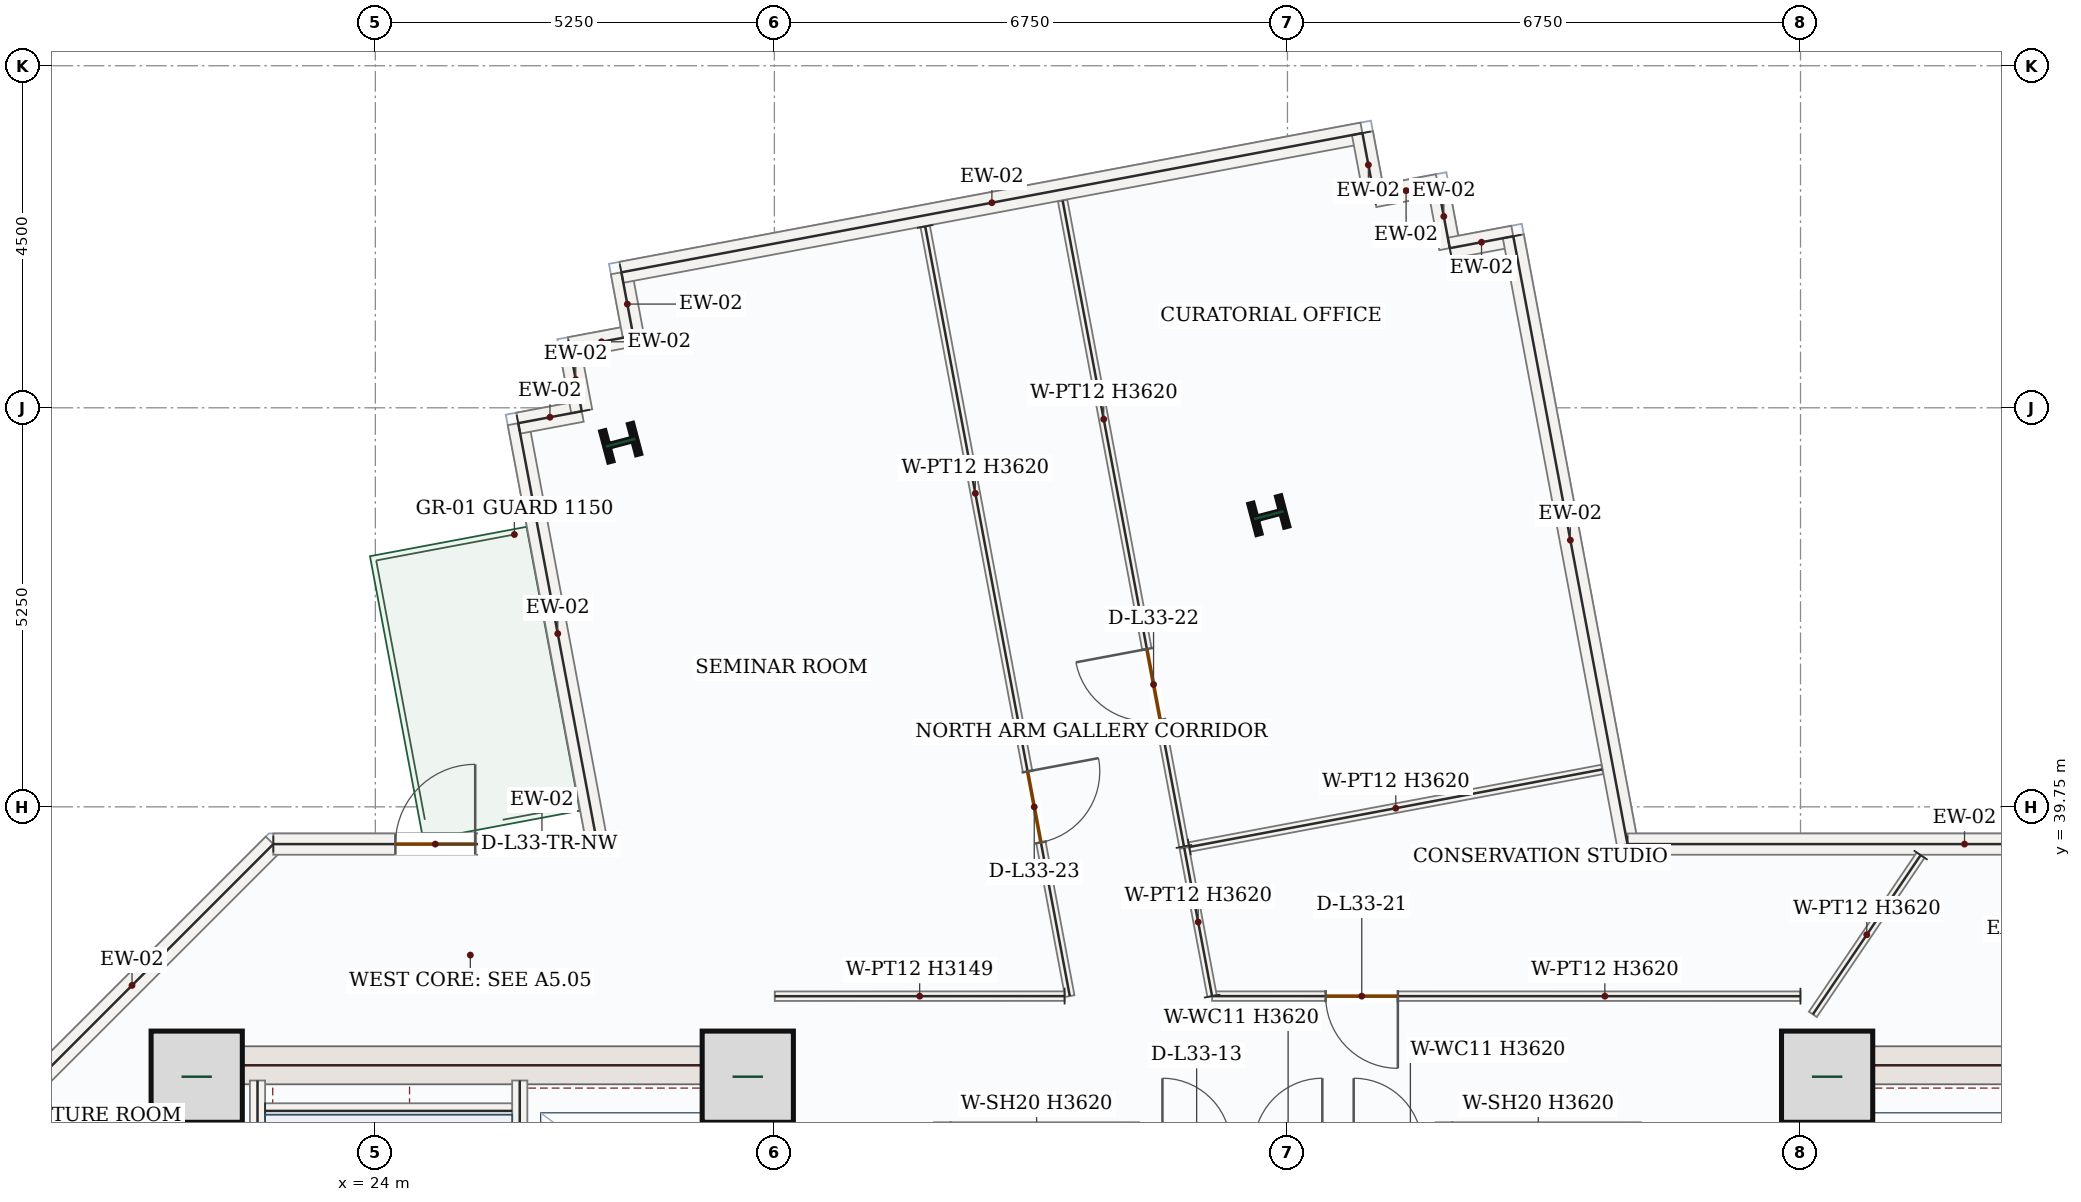
"""IFC4 building model, lengths in metres.
Left out: names, types, materials, properties, quantities, classifications, styles, units other than length and angle.
Written with IfcOpenShell. Run it as: python <this file> out.ifc"""

import sys

from ifc_helpers import new_model, si_unit, direction, frame, frame_2d, origin, origin_2d, place, context, subcontext, project, spatial, rectangle, i_section, extrude, source, transform, mapped, element, fill, save


model = new_model("IFC4")
c1 = context("Model", 3, precision=1e-05, world=origin(), true_north=direction((0.0, 1.0)))
c2 = subcontext(c1, "Body", "Model", "MODEL_VIEW")
j1 = project(units=[si_unit("LENGTHUNIT", "METRE"), si_unit("PLANEANGLEUNIT", "RADIAN")], contexts=[c1])
p1 = place(None, origin())
s1 = spatial("IfcSite", under=j1, at=p1, CompositionType="ELEMENT")
p2 = place(p1, origin())
s2 = spatial("IfcBuilding", under=s1, at=p2, CompositionType="ELEMENT")
p3 = place(p2, frame((0.0, 0.0, 147.3)))
s3 = spatial("IfcBuildingStorey", under=s2, at=p3, CompositionType="ELEMENT", Elevation=147.3)
m1 = source(origin(), c2, "Body", "SweptSolid", [
    extrude(rectangle(XDim=8.55, YDim=0.5, at=frame_2d((4.275, 0.0))), origin(), (0.0, 0.0, 1.0), 3.62),
])
p4 = place(p3, frame((21.5, 28.05, 0.0), z_axis=(0.0, 0.0, 1.0), x_axis=(0.0, 1.0, 0.0)))
e1 = element("IfcWall", 1, at=p4, inside=s3, PredefinedType="SHEAR", context=c2, shape_type="MappedRepresentation", body=[
    mapped(m1, transform((0.0, 0.0, 0.0), x_axis=(1.0, 0.0, 0.0), y_axis=(0.0, 1.0, 0.0), z_axis=(0.0, 0.0, 1.0), scale=1.0)),
])
p5 = place(p3, frame((29.0, 28.05, 0.0), z_axis=(0.0, 0.0, 1.0), x_axis=(0.0, 1.0, 0.0)))
e2 = element("IfcWall", 2, at=p5, inside=s3, PredefinedType="SHEAR", context=c2, shape_type="SweptSolid", body=[
    extrude(rectangle(XDim=8.55, YDim=0.5, at=frame_2d((4.275, 0.0))), origin(), (0.0, 0.0, 1.0), 3.62),
])
p6 = place(p5, frame((1.5, 0.0, 0.0)))
e3 = element("IfcOpeningElement", 3, at=p6, cuts=e2, PredefinedType="OPENING", context=c2, shape_type="SweptSolid", body=[
    extrude(rectangle(XDim=1.1, YDim=2.2, at=frame_2d((0.55, 1.1))), frame((0.0, 0.26, 0.0), z_axis=(0.0, -1.0, 0.0), x_axis=(1.0, 0.0, 0.0)), (0.0, 0.0, 1.0), 0.52),
])
m2 = source(origin(), c2, "Body", "SweptSolid", [
    extrude(rectangle(XDim=7.0, YDim=0.5, at=frame_2d((3.5, 0.0))), origin(), (0.0, 0.0, 1.0), 3.62),
])
p7 = place(p3, frame((21.75, 36.35, 0.0), z_axis=(0.0, 0.0, 1.0), x_axis=(1.0, 0.0, 0.0)))
e4 = element("IfcWall", 4, at=p7, inside=s3, PredefinedType="SHEAR", context=c2, shape_type="MappedRepresentation", body=[
    mapped(m2, transform((0.0, 0.0, 0.0), x_axis=(1.0, 0.0, 0.0), y_axis=(0.0, 1.0, 0.0), z_axis=(0.0, 0.0, 1.0), scale=1.0)),
])
p8 = place(p3, frame((43.0, 28.05, 0.0), z_axis=(0.0, 0.0, 1.0), x_axis=(0.0, 1.0, 0.0)))
e5 = element("IfcWall", 5, at=p8, inside=s3, PredefinedType="SHEAR", context=c2, shape_type="SweptSolid", body=[
    extrude(rectangle(XDim=8.55, YDim=0.5, at=frame_2d((4.275, 0.0))), origin(), (0.0, 0.0, 1.0), 3.62),
])
p9 = place(p8, frame((1.5, 0.0, 0.0)))
e6 = element("IfcOpeningElement", 6, at=p9, cuts=e5, PredefinedType="OPENING", context=c2, shape_type="SweptSolid", body=[
    extrude(rectangle(XDim=1.1, YDim=2.2, at=frame_2d((0.55, 1.1))), frame((0.0, 0.26, 0.0), z_axis=(0.0, -1.0, 0.0), x_axis=(1.0, 0.0, 0.0)), (0.0, 0.0, 1.0), 0.52),
])
p10 = place(p3, frame((43.25, 36.35, 0.0), z_axis=(0.0, 0.0, 1.0), x_axis=(1.0, 0.0, 0.0)))
e7 = element("IfcWall", 7, at=p10, inside=s3, PredefinedType="SHEAR", context=c2, shape_type="MappedRepresentation", body=[
    mapped(m2, transform((0.0, 0.0, 0.0), x_axis=(1.0, 0.0, 0.0), y_axis=(0.0, 1.0, 0.0), z_axis=(0.0, 0.0, 1.0), scale=1.0)),
])
m3 = source(origin(), c2, "Body", "SweptSolid", [
    extrude(rectangle(XDim=1.2, YDim=1.2, at=origin_2d()), origin(), (0.0, 0.0, 1.0), 3.9),
])
for number, where, z_axis, x_axis in (
    (8, (21.65, 36.2, 0.0), (0.0, 0.0, 1.0), (1.0, 0.0, 0.0)),
    (9, (28.9, 36.2, 0.0), (0.0, 0.0, 1.0), (1.0, 0.0, 0.0)),
    (10, (43.1, 36.2, 0.0), (0.0, 0.0, 1.0), (1.0, 0.0, 0.0)),
):
    element("IfcColumn", number, at=place(p3, frame(where, z_axis=z_axis, x_axis=x_axis)), inside=s3, PredefinedType="COLUMN", context=c2, shape_type="MappedRepresentation", body=[
        mapped(m3, transform((0.0, 0.0, 0.0), x_axis=(1.0, 0.0, 0.0), y_axis=(0.0, 1.0, 0.0), z_axis=(0.0, 0.0, 1.0), scale=1.0)),
    ])
m4 = source(origin(), c2, "Body", "SweptSolid", [
    extrude(i_section(OverallWidth=0.412, OverallDepth=0.435, WebThickness=0.036, FlangeThickness=0.057, FilletRadius=0.018, at=origin_2d()), origin(), (0.0, 0.0, 1.0), 3.9),
])
for number, where, z_axis, x_axis in (
    (11, (35.755, 43.588, 0.0), (0.0, 0.0, 1.0), (-0.255, 0.967, 0.0)),
    (12, (27.228, 44.541, 0.0), (0.0, 0.0, 1.0), (-0.255, 0.967, 0.0)),
):
    element("IfcColumn", number, at=place(p3, frame(where, z_axis=z_axis, x_axis=x_axis)), inside=s3, PredefinedType="COLUMN", context=c2, shape_type="MappedRepresentation", body=[
        mapped(m4, transform((0.0, 0.0, 0.0), x_axis=(1.0, 0.0, 0.0), y_axis=(0.0, 1.0, 0.0), z_axis=(0.0, 0.0, 1.0), scale=1.0)),
    ])
m5 = source(origin(), c2, "Body", "SweptSolid", [
    extrude(rectangle(XDim=5.258, YDim=0.28, at=frame_2d((2.629, 0.0))), origin(), (0.0, 0.0, 1.0), 3.62),
])
p11 = place(p3, frame((18.94, 35.542, 0.0), z_axis=(0.0, 0.0, 1.0), x_axis=(0.707106781187, 0.707106781187, 0.0)))
e13 = element("IfcWall", 13, at=p11, inside=s3, PredefinedType="SOLIDWALL", context=c2, shape_type="MappedRepresentation", body=[
    mapped(m5, transform((0.0, 0.0, 0.0), x_axis=(1.0, 0.0, 0.0), y_axis=(0.0, 1.0, 0.0), z_axis=(0.0, 0.0, 1.0), scale=1.0)),
])
p12 = place(p3, frame((22.658, 39.26, 0.0), z_axis=(0.0, 0.0, 1.0), x_axis=(1.0, 0.0, 0.0)))
e14 = element("IfcWall", 14, at=p12, inside=s3, PredefinedType="SOLIDWALL", context=c2, shape_type="SweptSolid", body=[
    extrude(rectangle(XDim=4.262, YDim=0.28, at=frame_2d((2.131, 0.0))), origin(), (0.0, 0.0, 1.0), 3.62),
])
p13 = place(p12, frame((1.606, 0.0, 0.0)))
e15 = element("IfcOpeningElement", 15, at=p13, cuts=e14, PredefinedType="OPENING", context=c2, shape_type="SweptSolid", body=[
    extrude(rectangle(XDim=1.05, YDim=2.15, at=frame_2d((0.525, 1.075))), frame((0.0, 0.15, 0.0), z_axis=(0.0, -1.0, 0.0), x_axis=(1.0, 0.0, 0.0)), (0.0, 0.0, 1.0), 0.3),
])
m6 = source(origin(), c2, "Body", "SweptSolid", [
    extrude(rectangle(XDim=5.634, YDim=0.28, at=frame_2d((2.817, 0.0))), origin(), (0.0, 0.0, 1.0), 3.62),
])
p14 = place(p3, frame((26.92, 39.26, 0.0), z_axis=(0.0, 0.0, 1.0), x_axis=(-0.184678339457, 0.982799018587, 0.0)))
e16 = element("IfcWall", 16, at=p14, inside=s3, PredefinedType="SOLIDWALL", context=c2, shape_type="MappedRepresentation", body=[
    mapped(m6, transform((0.0, 0.0, 0.0), x_axis=(1.0, 0.0, 0.0), y_axis=(0.0, 1.0, 0.0), z_axis=(0.0, 0.0, 1.0), scale=1.0)),
])
m7 = source(origin(), c2, "Body", "SweptSolid", [
    extrude(rectangle(XDim=0.85, YDim=0.28, at=frame_2d((0.425, 0.0))), origin(), (0.0, 0.0, 1.0), 3.62),
])
for number, where, z_axis, x_axis in (
    (17, (25.88, 44.797, 0.0), (0.0, 0.0, 1.0), (0.983, 0.185, 0.0)),
    (18, (26.715, 44.954, 0.0), (0.0, 0.0, 1.0), (-0.185, 0.983, 0.0)),
    (19, (26.558, 45.79, 0.0), (0.0, 0.0, 1.0), (0.983, 0.185, 0.0)),
    (20, (27.394, 45.947, 0.0), (0.0, 0.0, 1.0), (-0.185, 0.983, 0.0)),
):
    element("IfcWall", number, at=place(p3, frame(where, z_axis=z_axis, x_axis=x_axis)), inside=s3, PredefinedType="SOLIDWALL", context=c2, shape_type="MappedRepresentation", body=[
        mapped(m7, transform((0.0, 0.0, 0.0), x_axis=(1.0, 0.0, 0.0), y_axis=(0.0, 1.0, 0.0), z_axis=(0.0, 0.0, 1.0), scale=1.0)),
    ])
m8 = source(origin(), c2, "Body", "SweptSolid", [
    extrude(rectangle(XDim=9.92, YDim=0.28, at=frame_2d((4.96, 0.0))), origin(), (0.0, 0.0, 1.0), 3.62),
])
p15 = place(p3, frame((27.237, 46.782, 0.0), z_axis=(0.0, 0.0, 1.0), x_axis=(0.982807207568, 0.184634754994, 0.0)))
e21 = element("IfcWall", 21, at=p15, inside=s3, PredefinedType="SOLIDWALL", context=c2, shape_type="MappedRepresentation", body=[
    mapped(m8, transform((0.0, 0.0, 0.0), x_axis=(1.0, 0.0, 0.0), y_axis=(0.0, 1.0, 0.0), z_axis=(0.0, 0.0, 1.0), scale=1.0)),
])
for number, where, z_axis, x_axis in (
    (22, (36.986, 48.614, 0.0), (0.0, 0.0, 1.0), (0.185, -0.983, 0.0)),
    (23, (37.143, 47.778, 0.0), (0.0, 0.0, 1.0), (0.983, 0.185, 0.0)),
    (24, (37.979, 47.935, 0.0), (0.0, 0.0, 1.0), (0.185, -0.983, 0.0)),
    (25, (38.135, 47.1, 0.0), (0.0, 0.0, 1.0), (0.983, 0.185, 0.0)),
):
    element("IfcWall", number, at=place(p3, frame(where, z_axis=z_axis, x_axis=x_axis)), inside=s3, PredefinedType="SOLIDWALL", context=c2, shape_type="MappedRepresentation", body=[
        mapped(m7, transform((0.0, 0.0, 0.0), x_axis=(1.0, 0.0, 0.0), y_axis=(0.0, 1.0, 0.0), z_axis=(0.0, 0.0, 1.0), scale=1.0)),
    ])
m9 = source(origin(), c2, "Body", "SweptSolid", [
    extrude(rectangle(XDim=8.137, YDim=0.28, at=frame_2d((4.068, 0.0))), origin(), (0.0, 0.0, 1.0), 3.62),
])
p16 = place(p3, frame((38.971, 47.257, 0.0), z_axis=(0.0, 0.0, 1.0), x_axis=(0.184649032166, -0.982804525285, 0.0)))
e26 = element("IfcWall", 26, at=p16, inside=s3, PredefinedType="SOLIDWALL", context=c2, shape_type="MappedRepresentation", body=[
    mapped(m9, transform((0.0, 0.0, 0.0), x_axis=(1.0, 0.0, 0.0), y_axis=(0.0, 1.0, 0.0), z_axis=(0.0, 0.0, 1.0), scale=1.0)),
])
m10 = source(origin(), c2, "Body", "SweptSolid", [
    extrude(rectangle(XDim=8.869, YDim=0.28, at=frame_2d((4.434, 0.0))), origin(), (0.0, 0.0, 1.0), 3.62),
])
p17 = place(p3, frame((40.473, 39.26, 0.0), z_axis=(0.0, 0.0, 1.0), x_axis=(1.0, 0.0, 0.0)))
e27 = element("IfcWall", 27, at=p17, inside=s3, PredefinedType="SOLIDWALL", context=c2, shape_type="MappedRepresentation", body=[
    mapped(m10, transform((0.0, 0.0, 0.0), x_axis=(1.0, 0.0, 0.0), y_axis=(0.0, 1.0, 0.0), z_axis=(0.0, 0.0, 1.0), scale=1.0)),
])
m11 = source(origin(), c2, "Body", "SweptSolid", [
    extrude(rectangle(XDim=7.87, YDim=0.2, at=frame_2d((3.935, 0.0))), origin(), (0.0, 0.0, 1.0), 3.62),
])
p18 = place(p3, frame((22.45, 28.28, 0.0), z_axis=(0.0, 0.0, 1.0), x_axis=(0.0, 1.0, 0.0)))
e28 = element("IfcWall", 28, at=p18, inside=s3, PredefinedType="SOLIDWALL", context=c2, shape_type="MappedRepresentation", body=[
    mapped(m11, transform((0.0, 0.0, 0.0), x_axis=(1.0, 0.0, 0.0), y_axis=(0.0, 1.0, 0.0), z_axis=(0.0, 0.0, 1.0), scale=1.0)),
])
p19 = place(p3, frame((25.9, 28.15, 0.0), z_axis=(0.0, 0.0, 1.0), x_axis=(0.0, 1.0, 0.0)))
e29 = element("IfcWall", 29, at=p19, inside=s3, PredefinedType="SOLIDWALL", context=c2, shape_type="SweptSolid", body=[
    extrude(rectangle(XDim=8.0, YDim=0.2, at=frame_2d((4.0, 0.0))), origin(), (0.0, 0.0, 1.0), 3.62),
])
p20 = place(p19, frame((0.4, 0.0, 0.0)))
e30 = element("IfcOpeningElement", 30, at=p20, cuts=e29, PredefinedType="OPENING", context=c2, shape_type="SweptSolid", body=[
    extrude(rectangle(XDim=1.05, YDim=2.15, at=frame_2d((0.525, 1.075))), frame((0.0, 0.11, 0.0), z_axis=(0.0, -1.0, 0.0), x_axis=(1.0, 0.0, 0.0)), (0.0, 0.0, 1.0), 0.22),
])
m12 = source(origin(), c2, "Body", "SweptSolid", [
    extrude(rectangle(XDim=3.25, YDim=0.2, at=frame_2d((1.625, 0.0))), origin(), (0.0, 0.0, 1.0), 3.62),
])
p21 = place(p3, frame((22.55, 35.75, 0.0), z_axis=(0.0, 0.0, 1.0), x_axis=(1.0, 0.0, 0.0)))
e31 = element("IfcWall", 31, at=p21, inside=s3, PredefinedType="SOLIDWALL", context=c2, shape_type="MappedRepresentation", body=[
    mapped(m12, transform((0.0, 0.0, 0.0), x_axis=(1.0, 0.0, 0.0), y_axis=(0.0, 1.0, 0.0), z_axis=(0.0, 0.0, 1.0), scale=1.0)),
])
m13 = source(origin(), c2, "Body", "SweptSolid", [
    extrude(rectangle(XDim=2.4, YDim=0.2, at=frame_2d((1.2, 0.0))), origin(), (0.0, 0.0, 1.0), 3.62),
])
for number, where, z_axis, x_axis in (
    (32, (31.45, 33.2, 0.0), (0.0, 0.0, 1.0), (0.0, 1.0, 0.0)),
    (33, (33.95, 33.2, 0.0), (0.0, 0.0, 1.0), (0.0, 1.0, 0.0)),
    (34, (38.05, 33.2, 0.0), (0.0, 0.0, 1.0), (0.0, 1.0, 0.0)),
    (35, (40.55, 33.2, 0.0), (0.0, 0.0, 1.0), (0.0, 1.0, 0.0)),
):
    element("IfcWall", number, at=place(p3, frame(where, z_axis=z_axis, x_axis=x_axis)), inside=s3, PredefinedType="SOLIDWALL", context=c2, shape_type="MappedRepresentation", body=[
        mapped(m13, transform((0.0, 0.0, 0.0), x_axis=(1.0, 0.0, 0.0), y_axis=(0.0, 1.0, 0.0), z_axis=(0.0, 0.0, 1.0), scale=1.0)),
    ])
p22 = place(p3, frame((42.749, 37.259, 0.0), z_axis=(0.0, 0.0, 1.0), x_axis=(-0.999999992041, 0.000126163065, 0.0)))
e36 = element("IfcWall", 36, at=p22, inside=s3, PredefinedType="PARTITIONING", context=c2, shape_type="SweptSolid", body=[
    extrude(rectangle(XDim=7.74, YDim=0.125, at=frame_2d((3.87, 0.0))), origin(), (0.0, 0.0, 1.0), 3.62),
])
p23 = place(p22, frame((5.296, 0.0, 0.0)))
e37 = element("IfcOpeningElement", 37, at=p23, cuts=e36, PredefinedType="OPENING", context=c2, shape_type="SweptSolid", body=[
    extrude(rectangle(XDim=0.95, YDim=2.15, at=frame_2d((0.475, 1.075))), frame((0.0, 0.073, 0.0), z_axis=(0.0, -1.0, 0.0), x_axis=(1.0, 0.0, 0.0)), (0.0, 0.0, 1.0), 0.145),
])
m14 = source(origin(), c2, "Body", "SweptSolid", [
    extrude(rectangle(XDim=1.983, YDim=0.125, at=frame_2d((0.992, 0.0))), origin(), (0.0, 0.0, 1.0), 3.62),
])
p24 = place(p3, frame((35.009, 37.26, 0.0), z_axis=(0.0, 0.0, 1.0), x_axis=(-0.184645271511, 0.982805231828, 0.0)))
e38 = element("IfcWall", 38, at=p24, inside=s3, PredefinedType="PARTITIONING", context=c2, shape_type="MappedRepresentation", body=[
    mapped(m14, transform((0.0, 0.0, 0.0), x_axis=(1.0, 0.0, 0.0), y_axis=(0.0, 1.0, 0.0), z_axis=(0.0, 0.0, 1.0), scale=1.0)),
])
m15 = source(origin(), c2, "Body", "SweptSolid", [
    extrude(rectangle(XDim=5.527, YDim=0.125, at=frame_2d((2.764, 0.0))), origin(), (0.0, 0.0, 1.0), 3.62),
])
p25 = place(p3, frame((34.709, 39.222, 0.0), z_axis=(0.0, 0.0, 1.0), x_axis=(0.982808624954, 0.184627210117, 0.0)))
e39 = element("IfcWall", 39, at=p25, inside=s3, PredefinedType="PARTITIONING", context=c2, shape_type="MappedRepresentation", body=[
    mapped(m15, transform((0.0, 0.0, 0.0), x_axis=(1.0, 0.0, 0.0), y_axis=(0.0, 1.0, 0.0), z_axis=(0.0, 0.0, 1.0), scale=1.0)),
])
m16 = source(origin(), c2, "Body", "SweptSolid", [
    extrude(rectangle(XDim=2.53, YDim=0.125, at=frame_2d((1.265, 0.0))), origin(), (0.0, 0.0, 1.0), 3.62),
])
p26 = place(p3, frame((44.33, 39.115, 0.0), z_axis=(0.0, 0.0, 1.0), x_axis=(-0.560455418396, -0.82818459536, 0.0)))
e40 = element("IfcWall", 40, at=p26, inside=s3, PredefinedType="PARTITIONING", context=c2, shape_type="MappedRepresentation", body=[
    mapped(m16, transform((0.0, 0.0, 0.0), x_axis=(1.0, 0.0, 0.0), y_axis=(0.0, 1.0, 0.0), z_axis=(0.0, 0.0, 1.0), scale=1.0)),
])
p27 = place(p3, frame((34.639, 39.229, 0.0), z_axis=(0.0, 0.0, 1.0), x_axis=(-0.18463806937, 0.982806584908, 0.0)))
e41 = element("IfcWall", 41, at=p27, inside=s3, PredefinedType="PARTITIONING", context=c2, shape_type="SweptSolid", body=[
    extrude(rectangle(XDim=8.645, YDim=0.125, at=frame_2d((4.323, 0.0))), origin(), (0.0, 0.0, 1.0), 3.62),
])
p28 = place(p27, frame((1.693, 0.0, 0.0)))
e42 = element("IfcOpeningElement", 42, at=p28, cuts=e41, PredefinedType="OPENING", context=c2, shape_type="SweptSolid", body=[
    extrude(rectangle(XDim=0.95, YDim=2.15, at=frame_2d((0.475, 1.075))), frame((0.0, 0.073, 0.0), z_axis=(0.0, -1.0, 0.0), x_axis=(1.0, 0.0, 0.0)), (0.0, 0.0, 1.0), 0.145),
])
p29 = place(p3, frame((31.234, 47.385, 0.0), z_axis=(0.0, 0.0, 1.0), x_axis=(0.184646211839, -0.982805055163, 0.0)))
e43 = element("IfcWall", 43, at=p29, inside=s3, PredefinedType="PARTITIONING", context=c2, shape_type="SweptSolid", body=[
    extrude(rectangle(XDim=10.303, YDim=0.125, at=frame_2d((5.151, 0.0))), origin(), (0.0, 0.0, 1.0), 3.62),
])
p30 = place(p29, frame((7.295, 0.0, 0.0)))
e44 = element("IfcOpeningElement", 44, at=p30, cuts=e43, PredefinedType="OPENING", context=c2, shape_type="SweptSolid", body=[
    extrude(rectangle(XDim=0.95, YDim=2.15, at=frame_2d((0.475, 1.075))), frame((0.0, 0.073, 0.0), z_axis=(0.0, -1.0, 0.0), x_axis=(1.0, 0.0, 0.0)), (0.0, 0.0, 1.0), 0.145),
])
m17 = source(origin(), c2, "Body", "SweptSolid", [
    extrude(rectangle(XDim=3.813, YDim=0.125, at=frame_2d((1.906, 0.0))), origin(), (0.0, 0.0, 1.0), 3.149),
])
p31 = place(p3, frame((33.068, 37.26, 0.0), z_axis=(0.0, 0.0, 1.0), x_axis=(-0.999999948748, -0.000320163908, 0.0)))
e45 = element("IfcWall", 45, at=p31, inside=s3, PredefinedType="PARTITIONING", context=c2, shape_type="MappedRepresentation", body=[
    mapped(m17, transform((0.0, 0.0, 0.0), x_axis=(1.0, 0.0, 0.0), y_axis=(0.0, 1.0, 0.0), z_axis=(0.0, 0.0, 1.0), scale=1.0)),
])
m18 = source(origin(), c2, "Body", "SweptSolid", [
    extrude(rectangle(XDim=1.05, YDim=2.15, at=frame_2d((0.525, 1.075))), frame((0.0, 0.025, 0.0), z_axis=(0.0, -1.0, 0.0), x_axis=(1.0, 0.0, 0.0)), (0.0, 0.0, 1.0), 0.05),
])
p32 = place(p13, origin())
e46 = element("IfcDoor", 46, at=p32, inside=s3, OperationType="SINGLE_SWING_RIGHT", PredefinedType="DOOR", context=c2, shape_type="MappedRepresentation", body=[
    mapped(m18, transform((0.0, 0.0, 0.0), x_axis=(1.0, 0.0, 0.0), y_axis=(0.0, 1.0, 0.0), z_axis=(0.0, 0.0, 1.0), scale=1.0)),
])
fill(e15, e46)
m19 = source(origin(), c2, "Body", "SweptSolid", [
    extrude(rectangle(XDim=0.95, YDim=2.15, at=frame_2d((0.475, 1.075))), frame((0.0, 0.025, 0.0), z_axis=(0.0, -1.0, 0.0), x_axis=(1.0, 0.0, 0.0)), (0.0, 0.0, 1.0), 0.05),
])
p33 = place(p23, origin())
e47 = element("IfcDoor", 47, at=p33, inside=s3, OperationType="SINGLE_SWING_LEFT", PredefinedType="DOOR", context=c2, shape_type="MappedRepresentation", body=[
    mapped(m19, transform((0.0, 0.0, 0.0), x_axis=(1.0, 0.0, 0.0), y_axis=(0.0, 1.0, 0.0), z_axis=(0.0, 0.0, 1.0), scale=1.0)),
])
fill(e37, e47)
p34 = place(p28, origin())
e48 = element("IfcDoor", 48, at=p34, inside=s3, OperationType="SINGLE_SWING_RIGHT", PredefinedType="DOOR", context=c2, shape_type="MappedRepresentation", body=[
    mapped(m19, transform((0.0, 0.0, 0.0), x_axis=(1.0, 0.0, 0.0), y_axis=(0.0, 1.0, 0.0), z_axis=(0.0, 0.0, 1.0), scale=1.0)),
])
fill(e42, e48)
p35 = place(p30, origin())
e49 = element("IfcDoor", 49, at=p35, inside=s3, OperationType="SINGLE_SWING_LEFT", PredefinedType="DOOR", context=c2, shape_type="MappedRepresentation", body=[
    mapped(m19, transform((0.0, 0.0, 0.0), x_axis=(1.0, 0.0, 0.0), y_axis=(0.0, 1.0, 0.0), z_axis=(0.0, 0.0, 1.0), scale=1.0)),
])
fill(e44, e49)
save(model, sys.argv[1])
